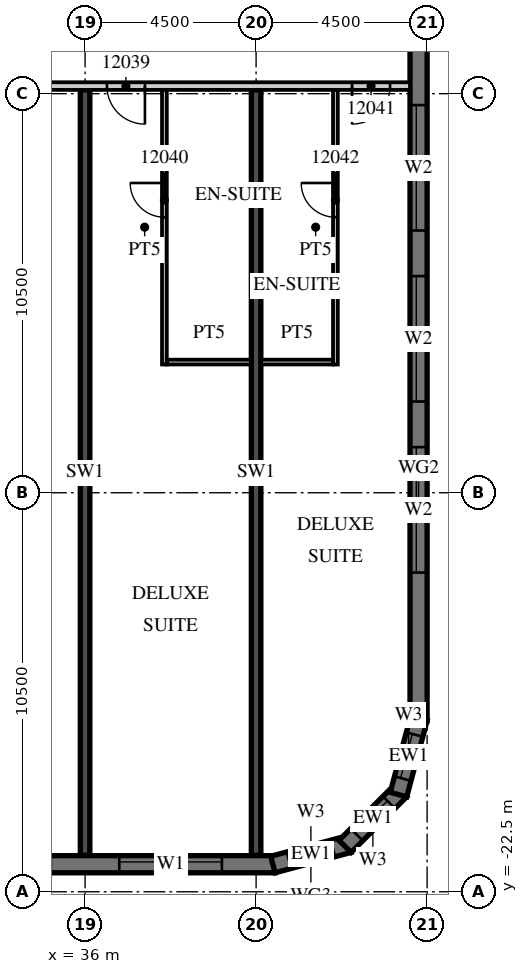
"""IFC4 building model, lengths in metres.
Left out: names, types, materials, properties, quantities, classifications, styles, units other than length and angle.
Written with IfcOpenShell. Run it as: python <this file> out.ifc"""

import sys

from ifc_helpers import new_model, si_unit, direction, frame, frame_2d, origin, place, context, subcontext, project, spatial, polyline, rectangle, outline, extrude, element, fill, save


model = new_model("IFC4")
c1 = context("Model", 3, precision=1e-05, world=origin(), true_north=direction((0.0, 1.0)))
c2 = subcontext(c1, "Body", "Model", "MODEL_VIEW")
j1 = project(units=[si_unit("LENGTHUNIT", "METRE"), si_unit("PLANEANGLEUNIT", "RADIAN")], contexts=[c1])
p1 = place(None, origin())
s1 = spatial("IfcSite", under=j1, at=p1, CompositionType="ELEMENT")
p2 = place(p1, origin())
s2 = spatial("IfcBuilding", under=s1, at=p2, CompositionType="ELEMENT")
p3 = place(p2, frame((0.0, 0.0, 69.9)))
s3 = spatial("IfcBuildingStorey", under=s2, at=p3, CompositionType="ELEMENT", Elevation=69.9)
for number, where, z_axis, x_axis in (
    (1, (36.0, -21.54, 0.0), (0.0, 0.0, 1.0), (0.0, 1.0, 0.0)),
    (2, (40.5, -21.54, 0.0), (0.0, 0.0, 1.0), (0.0, 1.0, 0.0)),
):
    element("IfcWall", number, at=place(p3, frame(where, z_axis=z_axis, x_axis=x_axis)), inside=s3, PredefinedType="SHEAR", context=c2, shape_type="SweptSolid", body=[
        extrude(rectangle(XDim=20.14, YDim=0.25, at=frame_2d((10.07, 0.0))), origin(), (0.0, 0.0, 1.0), 3.3),
    ])
p4 = place(p3, frame((-13.5, -21.775, 0.0), z_axis=(0.0, 0.0, 1.0), x_axis=(1.0, 0.0, 0.0)))
e3 = element("IfcWall", 3, at=p4, inside=s3, PredefinedType="SOLIDWALL", context=c2, shape_type="SweptSolid", body=[
    extrude(rectangle(XDim=54.5, YDim=0.45, at=frame_2d((27.25, 0.0))), origin(), (0.0, 0.0, 1.0), 3.02),
])
p5 = place(p4, frame((0.9, 0.0, 0.45)))
e4 = element("IfcOpeningElement", 4, at=p5, cuts=e3, PredefinedType="OPENING", context=c2, shape_type="SweptSolid", body=[
    extrude(rectangle(XDim=2.7, YDim=2.25, at=frame_2d((1.35, 1.125))), frame((0.0, 0.235, 0.0), z_axis=(0.0, -1.0, 0.0), x_axis=(1.0, 0.0, 0.0)), (0.0, 0.0, 1.0), 0.47),
])
p6 = place(p4, frame((5.4, 0.0, 0.45)))
e5 = element("IfcOpeningElement", 5, at=p6, cuts=e3, PredefinedType="OPENING", context=c2, shape_type="SweptSolid", body=[
    extrude(rectangle(XDim=2.7, YDim=2.25, at=frame_2d((1.35, 1.125))), frame((0.0, 0.235, 0.0), z_axis=(0.0, -1.0, 0.0), x_axis=(1.0, 0.0, 0.0)), (0.0, 0.0, 1.0), 0.47),
])
p7 = place(p4, frame((9.9, 0.0, 0.45)))
e6 = element("IfcOpeningElement", 6, at=p7, cuts=e3, PredefinedType="OPENING", context=c2, shape_type="SweptSolid", body=[
    extrude(rectangle(XDim=2.7, YDim=2.25, at=frame_2d((1.35, 1.125))), frame((0.0, 0.235, 0.0), z_axis=(0.0, -1.0, 0.0), x_axis=(1.0, 0.0, 0.0)), (0.0, 0.0, 1.0), 0.47),
])
p8 = place(p4, frame((14.4, 0.0, 0.45)))
e7 = element("IfcOpeningElement", 7, at=p8, cuts=e3, PredefinedType="OPENING", context=c2, shape_type="SweptSolid", body=[
    extrude(rectangle(XDim=2.7, YDim=2.25, at=frame_2d((1.35, 1.125))), frame((0.0, 0.235, 0.0), z_axis=(0.0, -1.0, 0.0), x_axis=(1.0, 0.0, 0.0)), (0.0, 0.0, 1.0), 0.47),
])
p9 = place(p4, frame((18.9, 0.0, 0.45)))
e8 = element("IfcOpeningElement", 8, at=p9, cuts=e3, PredefinedType="OPENING", context=c2, shape_type="SweptSolid", body=[
    extrude(rectangle(XDim=2.7, YDim=2.25, at=frame_2d((1.35, 1.125))), frame((0.0, 0.235, 0.0), z_axis=(0.0, -1.0, 0.0), x_axis=(1.0, 0.0, 0.0)), (0.0, 0.0, 1.0), 0.47),
])
p10 = place(p4, frame((23.4, 0.0, 0.45)))
e9 = element("IfcOpeningElement", 9, at=p10, cuts=e3, PredefinedType="OPENING", context=c2, shape_type="SweptSolid", body=[
    extrude(rectangle(XDim=2.7, YDim=2.25, at=frame_2d((1.35, 1.125))), frame((0.0, 0.235, 0.0), z_axis=(0.0, -1.0, 0.0), x_axis=(1.0, 0.0, 0.0)), (0.0, 0.0, 1.0), 0.47),
])
p11 = place(p4, frame((27.9, 0.0, 0.45)))
e10 = element("IfcOpeningElement", 10, at=p11, cuts=e3, PredefinedType="OPENING", context=c2, shape_type="SweptSolid", body=[
    extrude(rectangle(XDim=2.7, YDim=2.25, at=frame_2d((1.35, 1.125))), frame((0.0, 0.235, 0.0), z_axis=(0.0, -1.0, 0.0), x_axis=(1.0, 0.0, 0.0)), (0.0, 0.0, 1.0), 0.47),
])
p12 = place(p4, frame((32.4, 0.0, 0.45)))
e11 = element("IfcOpeningElement", 11, at=p12, cuts=e3, PredefinedType="OPENING", context=c2, shape_type="SweptSolid", body=[
    extrude(rectangle(XDim=2.7, YDim=2.25, at=frame_2d((1.35, 1.125))), frame((0.0, 0.235, 0.0), z_axis=(0.0, -1.0, 0.0), x_axis=(1.0, 0.0, 0.0)), (0.0, 0.0, 1.0), 0.47),
])
p13 = place(p4, frame((36.9, 0.0, 0.45)))
e12 = element("IfcOpeningElement", 12, at=p13, cuts=e3, PredefinedType="OPENING", context=c2, shape_type="SweptSolid", body=[
    extrude(rectangle(XDim=2.7, YDim=2.25, at=frame_2d((1.35, 1.125))), frame((0.0, 0.235, 0.0), z_axis=(0.0, -1.0, 0.0), x_axis=(1.0, 0.0, 0.0)), (0.0, 0.0, 1.0), 0.47),
])
p14 = place(p4, frame((41.4, 0.0, 0.45)))
e13 = element("IfcOpeningElement", 13, at=p14, cuts=e3, PredefinedType="OPENING", context=c2, shape_type="SweptSolid", body=[
    extrude(rectangle(XDim=2.7, YDim=2.25, at=frame_2d((1.35, 1.125))), frame((0.0, 0.235, 0.0), z_axis=(0.0, -1.0, 0.0), x_axis=(1.0, 0.0, 0.0)), (0.0, 0.0, 1.0), 0.47),
])
p15 = place(p4, frame((45.9, 0.0, 0.45)))
e14 = element("IfcOpeningElement", 14, at=p15, cuts=e3, PredefinedType="OPENING", context=c2, shape_type="SweptSolid", body=[
    extrude(rectangle(XDim=2.7, YDim=2.25, at=frame_2d((1.35, 1.125))), frame((0.0, 0.235, 0.0), z_axis=(0.0, -1.0, 0.0), x_axis=(1.0, 0.0, 0.0)), (0.0, 0.0, 1.0), 0.47),
])
p16 = place(p4, frame((50.4, 0.0, 0.45)))
e15 = element("IfcOpeningElement", 15, at=p16, cuts=e3, PredefinedType="OPENING", context=c2, shape_type="SweptSolid", body=[
    extrude(rectangle(XDim=2.7, YDim=2.25, at=frame_2d((1.35, 1.125))), frame((0.0, 0.235, 0.0), z_axis=(0.0, -1.0, 0.0), x_axis=(1.0, 0.0, 0.0)), (0.0, 0.0, 1.0), 0.47),
])
p17 = place(p3, frame((40.942, -21.783, 0.0), z_axis=(0.0, 0.0, 1.0), x_axis=(0.965926999034, 0.25881466832, 0.0)))
e16 = element("IfcWall", 16, at=p17, inside=s3, PredefinedType="SOLIDWALL", context=c2, shape_type="SweptSolid", body=[
    extrude(outline(polyline([(0.0, -0.225), (2.071, -0.225), (1.95, 0.225), (0.121, 0.225), (0.0, -0.225)])), origin(), (0.0, 0.0, 1.0), 3.02),
])
p18 = place(p17, frame((0.435, 0.0, 0.45)))
e17 = element("IfcOpeningElement", 17, at=p18, cuts=e16, PredefinedType="OPENING", context=c2, shape_type="SweptSolid", body=[
    extrude(rectangle(XDim=1.2, YDim=2.25, at=frame_2d((0.6, 1.125))), frame((0.0, 0.235, 0.0), z_axis=(0.0, -1.0, 0.0), x_axis=(1.0, 0.0, 0.0)), (0.0, 0.0, 1.0), 0.47),
])
p19 = place(p3, frame((42.841, -21.305, 0.0), z_axis=(0.0, 0.0, 1.0), x_axis=(0.707106781187, 0.707106781187, 0.0)))
e18 = element("IfcWall", 18, at=p19, inside=s3, PredefinedType="SOLIDWALL", context=c2, shape_type="SweptSolid", body=[
    extrude(outline(polyline([(0.0, -0.225), (2.071, -0.225), (1.95, 0.225), (0.121, 0.225), (0.0, -0.225)])), origin(), (0.0, 0.0, 1.0), 3.02),
])
p20 = place(p19, frame((0.435, 0.0, 0.45)))
e19 = element("IfcOpeningElement", 19, at=p20, cuts=e18, PredefinedType="OPENING", context=c2, shape_type="SweptSolid", body=[
    extrude(rectangle(XDim=1.2, YDim=2.25, at=frame_2d((0.6, 1.125))), frame((0.0, 0.235, 0.0), z_axis=(0.0, -1.0, 0.0), x_axis=(1.0, 0.0, 0.0)), (0.0, 0.0, 1.0), 0.47),
])
p21 = place(p3, frame((44.247, -19.942, 0.0), z_axis=(0.0, 0.0, 1.0), x_axis=(0.25881466832, 0.965926999034, 0.0)))
e20 = element("IfcWall", 20, at=p21, inside=s3, PredefinedType="SOLIDWALL", context=c2, shape_type="SweptSolid", body=[
    extrude(outline(polyline([(-0.0, -0.225), (2.07, -0.225), (1.95, 0.225), (0.12, 0.225), (-0.0, -0.225)])), origin(), (0.0, 0.0, 1.0), 3.02),
])
p22 = place(p21, frame((0.435, 0.0, 0.45)))
e21 = element("IfcOpeningElement", 21, at=p22, cuts=e20, PredefinedType="OPENING", context=c2, shape_type="SweptSolid", body=[
    extrude(rectangle(XDim=1.2, YDim=2.25, at=frame_2d((0.6, 1.125))), frame((0.0, 0.235, 0.0), z_axis=(0.0, -1.0, 0.0), x_axis=(1.0, 0.0, 0.0)), (0.0, 0.0, 1.0), 0.47),
])
p23 = place(p3, frame((44.775, -18.0, 0.0), z_axis=(0.0, 0.0, 1.0), x_axis=(0.0, 1.0, 0.0)))
e22 = element("IfcWall", 22, at=p23, inside=s3, PredefinedType="SOLIDWALL", context=c2, shape_type="SweptSolid", body=[
    extrude(rectangle(XDim=36.0, YDim=0.45, at=frame_2d((18.0, 0.0))), origin(), (0.0, 0.0, 1.0), 3.02),
])
p24 = place(p23, frame((3.9, 0.0, 0.45)))
e23 = element("IfcOpeningElement", 23, at=p24, cuts=e22, PredefinedType="OPENING", context=c2, shape_type="SweptSolid", body=[
    extrude(rectangle(XDim=3.3, YDim=2.25, at=frame_2d((1.65, 1.125))), frame((0.0, 0.235, 0.0), z_axis=(0.0, -1.0, 0.0), x_axis=(1.0, 0.0, 0.0)), (0.0, 0.0, 1.0), 0.47),
])
p25 = place(p23, frame((8.4, 0.0, 0.45)))
e24 = element("IfcOpeningElement", 24, at=p25, cuts=e22, PredefinedType="OPENING", context=c2, shape_type="SweptSolid", body=[
    extrude(rectangle(XDim=3.3, YDim=2.25, at=frame_2d((1.65, 1.125))), frame((0.0, 0.235, 0.0), z_axis=(0.0, -1.0, 0.0), x_axis=(1.0, 0.0, 0.0)), (0.0, 0.0, 1.0), 0.47),
])
p26 = place(p23, frame((12.9, 0.0, 0.45)))
e25 = element("IfcOpeningElement", 25, at=p26, cuts=e22, PredefinedType="OPENING", context=c2, shape_type="SweptSolid", body=[
    extrude(rectangle(XDim=3.3, YDim=2.25, at=frame_2d((1.65, 1.125))), frame((0.0, 0.235, 0.0), z_axis=(0.0, -1.0, 0.0), x_axis=(1.0, 0.0, 0.0)), (0.0, 0.0, 1.0), 0.47),
])
p27 = place(p3, frame((-13.5, -1.3, 0.0), z_axis=(0.0, 0.0, 1.0), x_axis=(1.0, 0.0, 0.0)))
e26 = element("IfcWall", 26, at=p27, inside=s3, PredefinedType="PARTITIONING", context=c2, shape_type="SweptSolid", body=[
    extrude(rectangle(XDim=58.05, YDim=0.2, at=frame_2d((29.025, 0.0))), origin(), (0.0, 0.0, 1.0), 3.02),
])
p28 = place(p27, frame((2.925, 0.0, 0.0)))
e27 = element("IfcOpeningElement", 27, at=p28, cuts=e26, PredefinedType="OPENING", context=c2, shape_type="SweptSolid", body=[
    extrude(rectangle(XDim=1.0, YDim=2.1, at=frame_2d((0.5, 1.05))), frame((0.0, 0.11, 0.0), z_axis=(0.0, -1.0, 0.0), x_axis=(1.0, 0.0, 0.0)), (0.0, 0.0, 1.0), 0.22),
])
p29 = place(p27, frame((5.075, 0.0, 0.0)))
e28 = element("IfcOpeningElement", 28, at=p29, cuts=e26, PredefinedType="OPENING", context=c2, shape_type="SweptSolid", body=[
    extrude(rectangle(XDim=1.0, YDim=2.1, at=frame_2d((0.5, 1.05))), frame((0.0, 0.11, 0.0), z_axis=(0.0, -1.0, 0.0), x_axis=(1.0, 0.0, 0.0)), (0.0, 0.0, 1.0), 0.22),
])
p30 = place(p27, frame((9.55, 0.0, 0.0)))
e29 = element("IfcOpeningElement", 29, at=p30, cuts=e26, PredefinedType="OPENING", context=c2, shape_type="SweptSolid", body=[
    extrude(rectangle(XDim=1.0, YDim=2.1, at=frame_2d((0.5, 1.05))), frame((0.0, 0.11, 0.0), z_axis=(0.0, -1.0, 0.0), x_axis=(1.0, 0.0, 0.0)), (0.0, 0.0, 1.0), 0.22),
])
p31 = place(p27, frame((18.862, 0.0, 0.0)))
e30 = element("IfcOpeningElement", 30, at=p31, cuts=e26, PredefinedType="OPENING", context=c2, shape_type="SweptSolid", body=[
    extrude(rectangle(XDim=1.2, YDim=2.1, at=frame_2d((0.6, 1.05))), frame((0.0, 0.11, 0.0), z_axis=(0.0, -1.0, 0.0), x_axis=(1.0, 0.0, 0.0)), (0.0, 0.0, 1.0), 0.22),
])
p32 = place(p27, frame((27.862, 0.0, 0.0)))
e31 = element("IfcOpeningElement", 31, at=p32, cuts=e26, PredefinedType="OPENING", context=c2, shape_type="SweptSolid", body=[
    extrude(rectangle(XDim=1.2, YDim=2.1, at=frame_2d((0.6, 1.05))), frame((0.0, 0.11, 0.0), z_axis=(0.0, -1.0, 0.0), x_axis=(1.0, 0.0, 0.0)), (0.0, 0.0, 1.0), 0.22),
])
p33 = place(p27, frame((34.45, 0.0, 0.0)))
e32 = element("IfcOpeningElement", 32, at=p33, cuts=e26, PredefinedType="OPENING", context=c2, shape_type="SweptSolid", body=[
    extrude(rectangle(XDim=1.0, YDim=2.1, at=frame_2d((0.5, 1.05))), frame((0.0, 0.11, 0.0), z_axis=(0.0, -1.0, 0.0), x_axis=(1.0, 0.0, 0.0)), (0.0, 0.0, 1.0), 0.22),
])
p34 = place(p27, frame((38.925, 0.0, 0.0)))
e33 = element("IfcOpeningElement", 33, at=p34, cuts=e26, PredefinedType="OPENING", context=c2, shape_type="SweptSolid", body=[
    extrude(rectangle(XDim=1.0, YDim=2.1, at=frame_2d((0.5, 1.05))), frame((0.0, 0.11, 0.0), z_axis=(0.0, -1.0, 0.0), x_axis=(1.0, 0.0, 0.0)), (0.0, 0.0, 1.0), 0.22),
])
p35 = place(p27, frame((45.862, 0.0, 0.0)))
e34 = element("IfcOpeningElement", 34, at=p35, cuts=e26, PredefinedType="OPENING", context=c2, shape_type="SweptSolid", body=[
    extrude(rectangle(XDim=1.2, YDim=2.1, at=frame_2d((0.6, 1.05))), frame((0.0, 0.11, 0.0), z_axis=(0.0, -1.0, 0.0), x_axis=(1.0, 0.0, 0.0)), (0.0, 0.0, 1.0), 0.22),
])
p36 = place(p27, frame((50.075, 0.0, 0.0)))
e35 = element("IfcOpeningElement", 35, at=p36, cuts=e26, PredefinedType="OPENING", context=c2, shape_type="SweptSolid", body=[
    extrude(rectangle(XDim=1.0, YDim=2.1, at=frame_2d((0.5, 1.05))), frame((0.0, 0.11, 0.0), z_axis=(0.0, -1.0, 0.0), x_axis=(1.0, 0.0, 0.0)), (0.0, 0.0, 1.0), 0.22),
])
p37 = place(p27, frame((56.525, 0.0, 0.0)))
e36 = element("IfcOpeningElement", 36, at=p37, cuts=e26, PredefinedType="OPENING", context=c2, shape_type="SweptSolid", body=[
    extrude(rectangle(XDim=1.0, YDim=2.1, at=frame_2d((0.5, 1.05))), frame((0.0, 0.11, 0.0), z_axis=(0.0, -1.0, 0.0), x_axis=(1.0, 0.0, 0.0)), (0.0, 0.0, 1.0), 0.22),
])
p38 = place(p3, frame((38.087, -8.625, 0.0), z_axis=(0.0, 0.0, 1.0), x_axis=(0.0, 1.0, 0.0)))
e37 = element("IfcWall", 37, at=p38, inside=s3, PredefinedType="PARTITIONING", context=c2, shape_type="SweptSolid", body=[
    extrude(rectangle(XDim=7.225, YDim=0.125, at=frame_2d((3.613, 0.0))), origin(), (0.0, 0.0, 1.0), 3.02),
])
p39 = place(p38, frame((3.875, 0.0, 0.0)))
e38 = element("IfcOpeningElement", 38, at=p39, cuts=e37, PredefinedType="OPENING", context=c2, shape_type="SweptSolid", body=[
    extrude(rectangle(XDim=0.9, YDim=2.1, at=frame_2d((0.45, 1.05))), frame((0.0, 0.073, 0.0), z_axis=(0.0, -1.0, 0.0), x_axis=(1.0, 0.0, 0.0)), (0.0, 0.0, 1.0), 0.145),
])
p40 = place(p3, frame((38.15, -8.562, 0.0), z_axis=(0.0, 0.0, 1.0), x_axis=(1.0, 0.0, 0.0)))
e39 = element("IfcWall", 39, at=p40, inside=s3, PredefinedType="PARTITIONING", context=c2, shape_type="SweptSolid", body=[
    extrude(rectangle(XDim=2.225, YDim=0.125, at=frame_2d((1.113, 0.0))), origin(), (0.0, 0.0, 1.0), 3.02),
])
p41 = place(p3, frame((42.587, -8.625, 0.0), z_axis=(0.0, 0.0, 1.0), x_axis=(0.0, 1.0, 0.0)))
e40 = element("IfcWall", 40, at=p41, inside=s3, PredefinedType="PARTITIONING", context=c2, shape_type="SweptSolid", body=[
    extrude(rectangle(XDim=7.225, YDim=0.125, at=frame_2d((3.613, 0.0))), origin(), (0.0, 0.0, 1.0), 3.02),
])
p42 = place(p41, frame((3.875, 0.0, 0.0)))
e41 = element("IfcOpeningElement", 41, at=p42, cuts=e40, PredefinedType="OPENING", context=c2, shape_type="SweptSolid", body=[
    extrude(rectangle(XDim=0.9, YDim=2.1, at=frame_2d((0.45, 1.05))), frame((0.0, 0.073, 0.0), z_axis=(0.0, -1.0, 0.0), x_axis=(1.0, 0.0, 0.0)), (0.0, 0.0, 1.0), 0.145),
])
p43 = place(p3, frame((40.625, -8.562, 0.0), z_axis=(0.0, 0.0, 1.0), x_axis=(1.0, 0.0, 0.0)))
e42 = element("IfcWall", 42, at=p43, inside=s3, PredefinedType="PARTITIONING", context=c2, shape_type="SweptSolid", body=[
    extrude(rectangle(XDim=1.9, YDim=0.125, at=frame_2d((0.95, 0.0))), origin(), (0.0, 0.0, 1.0), 3.02),
])
p44 = place(p16, origin())
e43 = element("IfcWindow", 43, at=p44, inside=s3, PartitioningType="SINGLE_PANEL", PredefinedType="WINDOW", context=c2, shape_type="SweptSolid", body=[
    extrude(rectangle(XDim=2.7, YDim=2.25, at=frame_2d((1.35, 1.125))), frame((0.0, 0.09, 0.0), z_axis=(0.0, -1.0, 0.0), x_axis=(1.0, 0.0, 0.0)), (0.0, 0.0, 1.0), 0.06),
])
fill(e15, e43)
p45 = place(p18, origin())
e44 = element("IfcWindow", 44, at=p45, inside=s3, PartitioningType="SINGLE_PANEL", PredefinedType="WINDOW", context=c2, shape_type="SweptSolid", body=[
    extrude(rectangle(XDim=1.2, YDim=2.25, at=frame_2d((0.6, 1.125))), frame((0.0, 0.09, 0.0), z_axis=(0.0, -1.0, 0.0), x_axis=(1.0, 0.0, 0.0)), (0.0, 0.0, 1.0), 0.06),
])
fill(e17, e44)
p46 = place(p20, origin())
e45 = element("IfcWindow", 45, at=p46, inside=s3, PartitioningType="SINGLE_PANEL", PredefinedType="WINDOW", context=c2, shape_type="SweptSolid", body=[
    extrude(rectangle(XDim=1.2, YDim=2.25, at=frame_2d((0.6, 1.125))), frame((0.0, 0.09, 0.0), z_axis=(0.0, -1.0, 0.0), x_axis=(1.0, 0.0, 0.0)), (0.0, 0.0, 1.0), 0.06),
])
fill(e19, e45)
p47 = place(p22, origin())
e46 = element("IfcWindow", 46, at=p47, inside=s3, PartitioningType="SINGLE_PANEL", PredefinedType="WINDOW", context=c2, shape_type="SweptSolid", body=[
    extrude(rectangle(XDim=1.2, YDim=2.25, at=frame_2d((0.6, 1.125))), frame((0.0, 0.09, 0.0), z_axis=(0.0, -1.0, 0.0), x_axis=(1.0, 0.0, 0.0)), (0.0, 0.0, 1.0), 0.06),
])
fill(e21, e46)
p48 = place(p24, origin())
e47 = element("IfcWindow", 47, at=p48, inside=s3, PartitioningType="SINGLE_PANEL", PredefinedType="WINDOW", context=c2, shape_type="SweptSolid", body=[
    extrude(rectangle(XDim=3.3, YDim=2.25, at=frame_2d((1.65, 1.125))), frame((0.0, 0.09, 0.0), z_axis=(0.0, -1.0, 0.0), x_axis=(1.0, 0.0, 0.0)), (0.0, 0.0, 1.0), 0.06),
])
fill(e23, e47)
p49 = place(p25, origin())
e48 = element("IfcWindow", 48, at=p49, inside=s3, PartitioningType="SINGLE_PANEL", PredefinedType="WINDOW", context=c2, shape_type="SweptSolid", body=[
    extrude(rectangle(XDim=3.3, YDim=2.25, at=frame_2d((1.65, 1.125))), frame((0.0, 0.09, 0.0), z_axis=(0.0, -1.0, 0.0), x_axis=(1.0, 0.0, 0.0)), (0.0, 0.0, 1.0), 0.06),
])
fill(e24, e48)
p50 = place(p26, origin())
e49 = element("IfcWindow", 49, at=p50, inside=s3, PartitioningType="SINGLE_PANEL", PredefinedType="WINDOW", context=c2, shape_type="SweptSolid", body=[
    extrude(rectangle(XDim=3.3, YDim=2.25, at=frame_2d((1.65, 1.125))), frame((0.0, 0.09, 0.0), z_axis=(0.0, -1.0, 0.0), x_axis=(1.0, 0.0, 0.0)), (0.0, 0.0, 1.0), 0.06),
])
fill(e25, e49)
p51 = place(p36, origin())
e50 = element("IfcDoor", 50, at=p51, inside=s3, OperationType="SINGLE_SWING_RIGHT", PredefinedType="DOOR", context=c2, shape_type="SweptSolid", body=[
    extrude(rectangle(XDim=1.0, YDim=2.1, at=frame_2d((0.5, 1.05))), frame((0.0, 0.025, 0.0), z_axis=(0.0, -1.0, 0.0), x_axis=(1.0, 0.0, 0.0)), (0.0, 0.0, 1.0), 0.05),
])
fill(e35, e50)
p52 = place(p39, origin())
e51 = element("IfcDoor", 51, at=p52, inside=s3, OperationType="SINGLE_SWING_RIGHT", PredefinedType="DOOR", context=c2, shape_type="SweptSolid", body=[
    extrude(rectangle(XDim=0.9, YDim=2.1, at=frame_2d((0.45, 1.05))), frame((0.0, 0.025, 0.0), z_axis=(0.0, -1.0, 0.0), x_axis=(1.0, 0.0, 0.0)), (0.0, 0.0, 1.0), 0.05),
])
fill(e38, e51)
p53 = place(p37, origin())
e52 = element("IfcDoor", 52, at=p53, inside=s3, OperationType="SINGLE_SWING_LEFT", PredefinedType="DOOR", context=c2, shape_type="SweptSolid", body=[
    extrude(rectangle(XDim=1.0, YDim=2.1, at=frame_2d((0.5, 1.05))), frame((0.0, 0.025, 0.0), z_axis=(0.0, -1.0, 0.0), x_axis=(1.0, 0.0, 0.0)), (0.0, 0.0, 1.0), 0.05),
])
fill(e36, e52)
p54 = place(p42, origin())
e53 = element("IfcDoor", 53, at=p54, inside=s3, OperationType="SINGLE_SWING_RIGHT", PredefinedType="DOOR", context=c2, shape_type="SweptSolid", body=[
    extrude(rectangle(XDim=0.9, YDim=2.1, at=frame_2d((0.45, 1.05))), frame((0.0, 0.025, 0.0), z_axis=(0.0, -1.0, 0.0), x_axis=(1.0, 0.0, 0.0)), (0.0, 0.0, 1.0), 0.05),
])
fill(e41, e53)
save(model, sys.argv[1])
